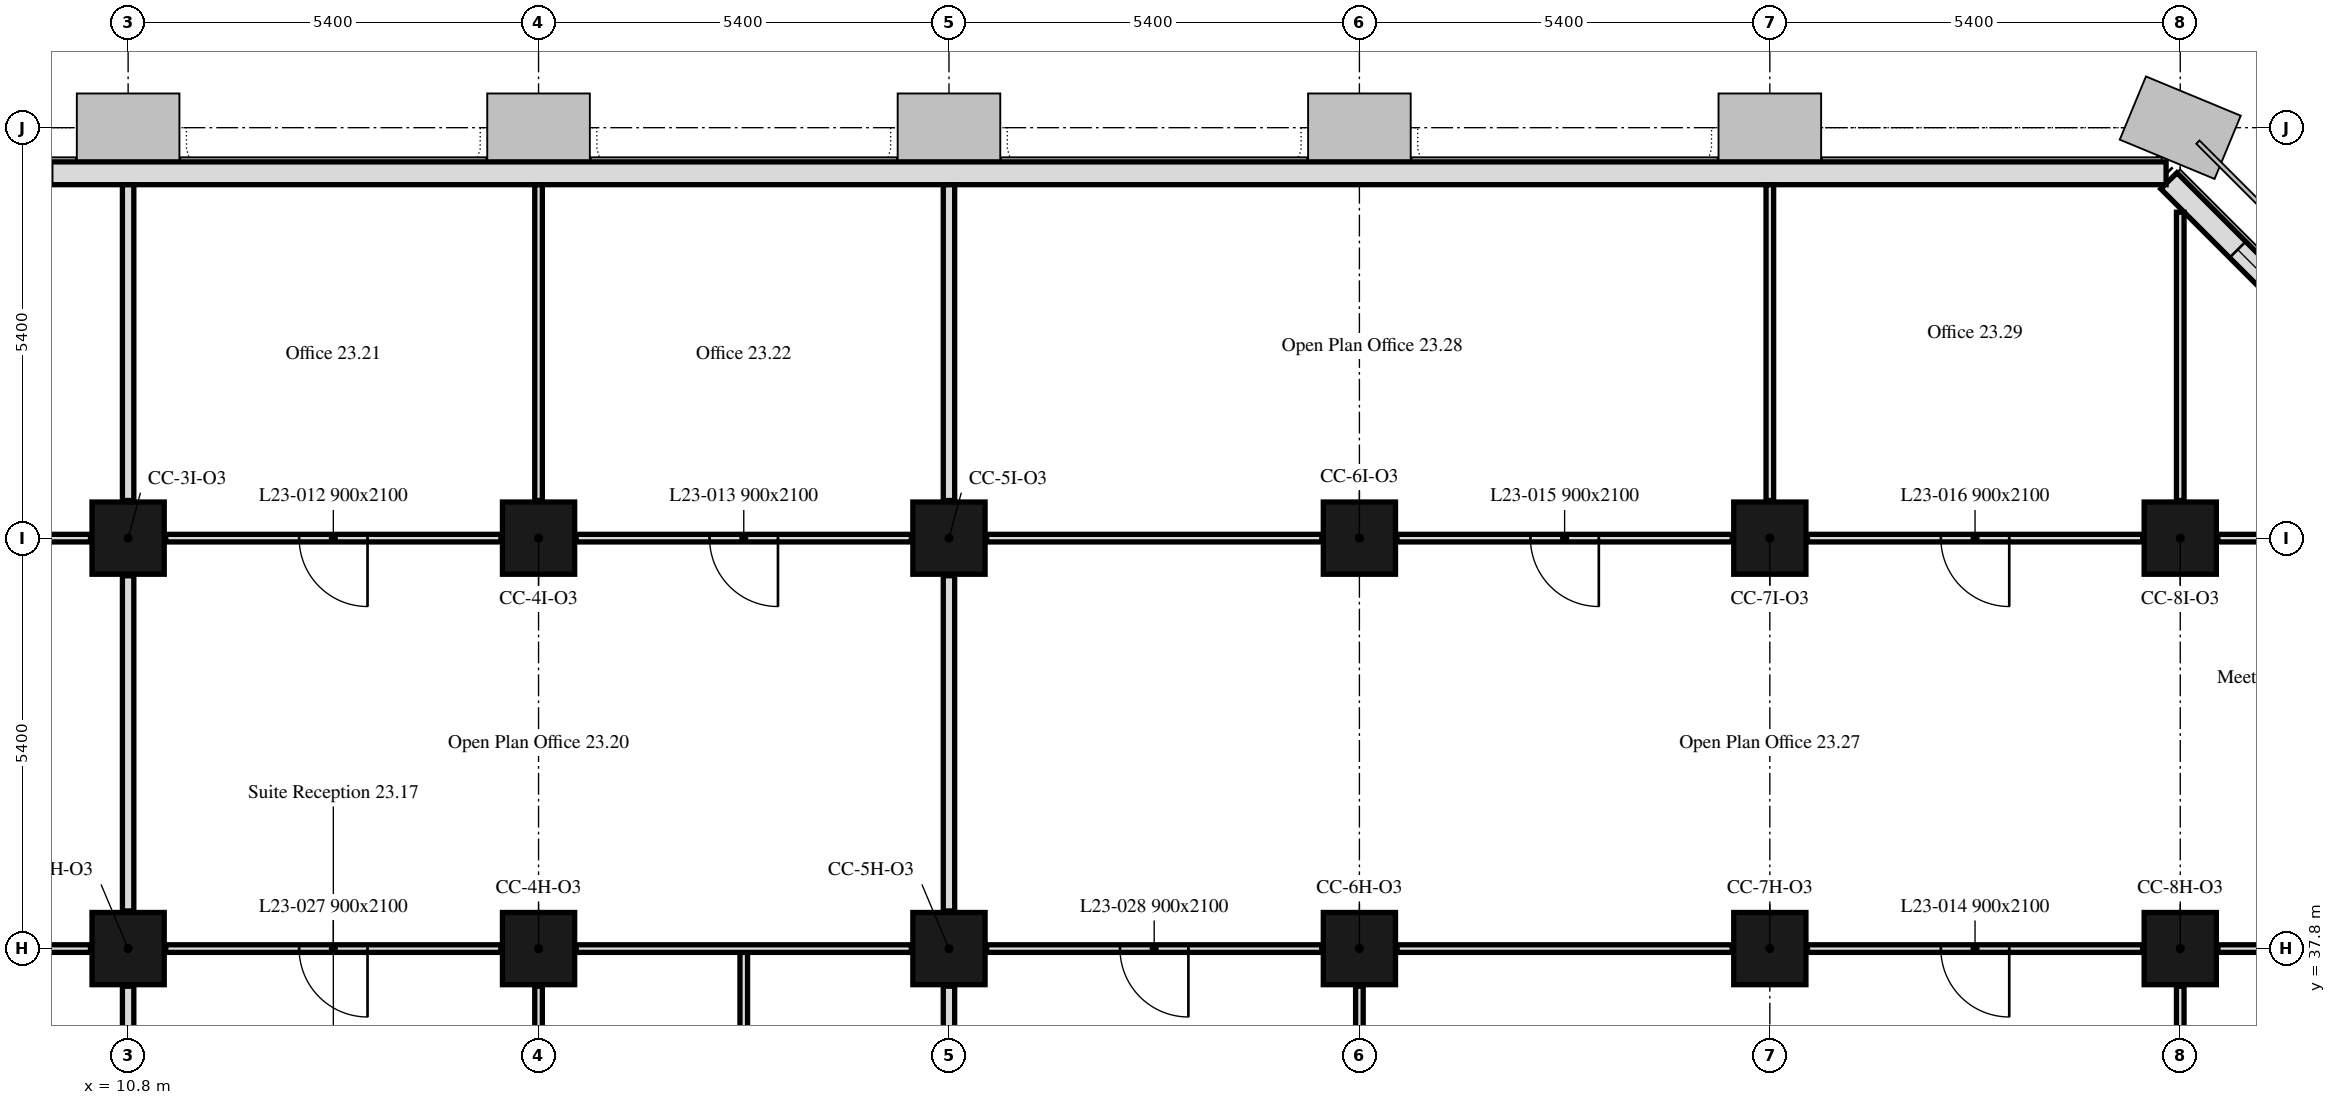
"""IFC4 building model, lengths in metres.
Left out: names, types, materials, properties, quantities, classifications, styles, units other than length and angle.
Written with IfcOpenShell. Run it as: python <this file> out.ifc"""

import sys

from ifc_helpers import new_model, si_unit, direction, frame, frame_2d, origin, origin_2d, place, context, subcontext, project, spatial, rectangle, extrude, element, fill, save


model = new_model("IFC4")
c1 = context("Model", 3, precision=1e-05, world=origin(), true_north=direction((0.0, 1.0)))
c2 = subcontext(c1, "Body", "Model", "MODEL_VIEW")
j1 = project(units=[si_unit("LENGTHUNIT", "METRE"), si_unit("PLANEANGLEUNIT", "RADIAN")], contexts=[c1])
p1 = place(None, origin())
s1 = spatial("IfcSite", under=j1, at=p1, CompositionType="ELEMENT")
p2 = place(p1, origin())
s2 = spatial("IfcBuilding", under=s1, at=p2, CompositionType="ELEMENT")
p3 = place(p2, frame((0.0, 0.0, 99.2)))
s3 = spatial("IfcBuildingStorey", under=s2, at=p3, CompositionType="ELEMENT", Elevation=99.2)
for number, where, z_axis, x_axis in (
    (1, (10.8, 37.8, 0.0), (0.0, 0.0, 1.0), (1.0, 0.0, 0.0)),
    (2, (16.2, 37.8, 0.0), (0.0, 0.0, 1.0), (1.0, 0.0, 0.0)),
    (3, (21.6, 37.8, 0.0), (0.0, 0.0, 1.0), (1.0, 0.0, 0.0)),
    (4, (27.0, 37.8, 0.0), (0.0, 0.0, 1.0), (1.0, 0.0, 0.0)),
    (5, (32.4, 37.8, 0.0), (0.0, 0.0, 1.0), (1.0, 0.0, 0.0)),
    (6, (37.8, 37.8, 0.0), (0.0, 0.0, 1.0), (1.0, 0.0, 0.0)),
    (7, (10.8, 43.2, 0.0), (0.0, 0.0, 1.0), (1.0, 0.0, 0.0)),
    (8, (16.2, 43.2, 0.0), (0.0, 0.0, 1.0), (1.0, 0.0, 0.0)),
    (9, (21.6, 43.2, 0.0), (0.0, 0.0, 1.0), (1.0, 0.0, 0.0)),
    (10, (27.0, 43.2, 0.0), (0.0, 0.0, 1.0), (1.0, 0.0, 0.0)),
    (11, (32.4, 43.2, 0.0), (0.0, 0.0, 1.0), (1.0, 0.0, 0.0)),
    (12, (37.8, 43.2, 0.0), (0.0, 0.0, 1.0), (1.0, 0.0, 0.0)),
):
    element("IfcColumn", number, at=place(p3, frame(where, z_axis=z_axis, x_axis=x_axis)), inside=s3, PredefinedType="COLUMN", context=c2, shape_type="SweptSolid", body=[
        extrude(rectangle(XDim=0.95, YDim=0.95, at=origin_2d()), origin(), (0.0, 0.0, 1.0), 3.5),
    ])
p4 = place(p3, frame((42.501, 43.051, 0.0), z_axis=(0.0, 0.0, 1.0), x_axis=(-0.707106781187, 0.707106781187, 0.0)))
e13 = element("IfcWall", 13, at=p4, inside=s3, PredefinedType="SOLIDWALL", context=c2, shape_type="SweptSolid", body=[
    extrude(rectangle(XDim=6.86, YDim=0.3, at=frame_2d((3.43, 0.0))), origin(), (0.0, 0.0, 1.0), 3.5),
])
p5 = place(p4, frame((1.28, 0.0, 0.9)))
e14 = element("IfcOpeningElement", 14, at=p5, cuts=e13, PredefinedType="OPENING", context=c2, shape_type="SweptSolid", body=[
    extrude(rectangle(XDim=1.1, YDim=1.7, at=frame_2d((0.55, 0.85))), frame((0.0, 0.16, 0.0), z_axis=(0.0, -1.0, 0.0), x_axis=(1.0, 0.0, 0.0)), (0.0, 0.0, 1.0), 0.32),
])
p6 = place(p4, frame((4.48, 0.0, 0.9)))
e15 = element("IfcOpeningElement", 15, at=p6, cuts=e13, PredefinedType="OPENING", context=c2, shape_type="SweptSolid", body=[
    extrude(rectangle(XDim=1.1, YDim=1.7, at=frame_2d((0.55, 0.85))), frame((0.0, 0.16, 0.0), z_axis=(0.0, -1.0, 0.0), x_axis=(1.0, 0.0, 0.0)), (0.0, 0.0, 1.0), 0.32),
])
p7 = place(p3, frame((37.614, 48.0, 0.0), z_axis=(0.0, 0.0, 1.0), x_axis=(-1.0, 0.0, 0.0)))
e16 = element("IfcWall", 16, at=p7, inside=s3, PredefinedType="SOLIDWALL", context=c2, shape_type="SweptSolid", body=[
    extrude(rectangle(XDim=32.027, YDim=0.3, at=frame_2d((16.014, 0.0))), origin(), (0.0, 0.0, 1.0), 3.5),
])
p8 = place(p7, frame((27.814, 0.0, 0.9)))
e17 = element("IfcOpeningElement", 17, at=p8, cuts=e16, PredefinedType="OPENING", context=c2, shape_type="SweptSolid", body=[
    extrude(rectangle(XDim=3.4, YDim=1.7, at=frame_2d((1.7, 0.85))), frame((0.0, 0.16, 0.0), z_axis=(0.0, -1.0, 0.0), x_axis=(1.0, 0.0, 0.0)), (0.0, 0.0, 1.0), 0.32),
])
p9 = place(p3, frame((10.8, 35.175, 0.0), z_axis=(0.0, 0.0, 1.0), x_axis=(0.0, 1.0, 0.0)))
e18 = element("IfcWall", 18, at=p9, inside=s3, PredefinedType="PARTITIONING", context=c2, shape_type="SweptSolid", body=[
    extrude(rectangle(XDim=2.13, YDim=0.15, at=frame_2d((1.065, 0.0))), origin(), (0.0, 0.0, 1.0), 2.75),
])
p10 = place(p3, frame((10.305, 37.8, 0.0), z_axis=(0.0, 0.0, 1.0), x_axis=(-1.0, 0.0, 0.0)))
e19 = element("IfcWall", 19, at=p10, inside=s3, PredefinedType="PARTITIONING", context=c2, shape_type="SweptSolid", body=[
    extrude(rectangle(XDim=4.41, YDim=0.1, at=frame_2d((2.205, 0.0))), origin(), (0.0, 0.0, 1.0), 2.75),
])
p11 = place(p3, frame((10.305, 43.2, 0.0), z_axis=(0.0, 0.0, 1.0), x_axis=(-1.0, 0.0, 0.0)))
e20 = element("IfcWall", 20, at=p11, inside=s3, PredefinedType="PARTITIONING", context=c2, shape_type="SweptSolid", body=[
    extrude(rectangle(XDim=9.193, YDim=0.1, at=frame_2d((4.596, 0.0))), origin(), (0.0, 0.0, 1.0), 3.5),
])
p12 = place(p11, frame((4.455, 0.0, 0.0)))
e21 = element("IfcOpeningElement", 21, at=p12, cuts=e20, PredefinedType="OPENING", context=c2, shape_type="SweptSolid", body=[
    extrude(rectangle(XDim=0.9, YDim=2.1, at=frame_2d((0.45, 1.05))), frame((0.0, 0.05, 0.0), z_axis=(0.0, -1.0, 0.0), x_axis=(1.0, 0.0, 0.0)), (0.0, 0.0, 1.0), 0.1),
])
p13 = place(p3, frame((10.8, 38.295, 0.0), z_axis=(0.0, 0.0, 1.0), x_axis=(0.0, 1.0, 0.0)))
e22 = element("IfcWall", 22, at=p13, inside=s3, PredefinedType="PARTITIONING", context=c2, shape_type="SweptSolid", body=[
    extrude(rectangle(XDim=4.41, YDim=0.15, at=frame_2d((2.205, 0.0))), origin(), (0.0, 0.0, 1.0), 2.75),
])
p14 = place(p3, frame((10.8, 43.695, 0.0), z_axis=(0.0, 0.0, 1.0), x_axis=(0.0, 1.0, 0.0)))
e23 = element("IfcWall", 23, at=p14, inside=s3, PredefinedType="PARTITIONING", context=c2, shape_type="SweptSolid", body=[
    extrude(rectangle(XDim=4.154, YDim=0.15, at=frame_2d((2.077, 0.0))), origin(), (0.0, 0.0, 1.0), 2.75),
])
p15 = place(p3, frame((16.2, 35.175, 0.0), z_axis=(0.0, 0.0, 1.0), x_axis=(0.0, 1.0, 0.0)))
e24 = element("IfcWall", 24, at=p15, inside=s3, PredefinedType="PARTITIONING", context=c2, shape_type="SweptSolid", body=[
    extrude(rectangle(XDim=2.13, YDim=0.1, at=frame_2d((1.065, 0.0))), origin(), (0.0, 0.0, 1.0), 2.75),
])
p16 = place(p3, frame((15.705, 37.8, 0.0), z_axis=(0.0, 0.0, 1.0), x_axis=(-1.0, 0.0, 0.0)))
e25 = element("IfcWall", 25, at=p16, inside=s3, PredefinedType="PARTITIONING", context=c2, shape_type="SweptSolid", body=[
    extrude(rectangle(XDim=4.41, YDim=0.1, at=frame_2d((2.205, 0.0))), origin(), (0.0, 0.0, 1.0), 2.75),
])
p17 = place(p16, frame((1.755, 0.0, 0.0)))
e26 = element("IfcOpeningElement", 26, at=p17, cuts=e25, PredefinedType="OPENING", context=c2, shape_type="SweptSolid", body=[
    extrude(rectangle(XDim=0.9, YDim=2.1, at=frame_2d((0.45, 1.05))), frame((0.0, 0.05, 0.0), z_axis=(0.0, -1.0, 0.0), x_axis=(1.0, 0.0, 0.0)), (0.0, 0.0, 1.0), 0.1),
])
p18 = place(p3, frame((18.9, 35.175, 0.0), z_axis=(0.0, 0.0, 1.0), x_axis=(0.0, 1.0, 0.0)))
e27 = element("IfcWall", 27, at=p18, inside=s3, PredefinedType="PARTITIONING", context=c2, shape_type="SweptSolid", body=[
    extrude(rectangle(XDim=2.575, YDim=0.1, at=frame_2d((1.288, 0.0))), origin(), (0.0, 0.0, 1.0), 3.5),
])
p19 = place(p3, frame((21.6, 35.175, 0.0), z_axis=(0.0, 0.0, 1.0), x_axis=(0.0, 1.0, 0.0)))
e28 = element("IfcWall", 28, at=p19, inside=s3, PredefinedType="PARTITIONING", context=c2, shape_type="SweptSolid", body=[
    extrude(rectangle(XDim=2.13, YDim=0.15, at=frame_2d((1.065, 0.0))), origin(), (0.0, 0.0, 1.0), 2.75),
])
p20 = place(p3, frame((21.105, 37.8, 0.0), z_axis=(0.0, 0.0, 1.0), x_axis=(-1.0, 0.0, 0.0)))
e29 = element("IfcWall", 29, at=p20, inside=s3, PredefinedType="PARTITIONING", context=c2, shape_type="SweptSolid", body=[
    extrude(rectangle(XDim=4.41, YDim=0.1, at=frame_2d((2.205, 0.0))), origin(), (0.0, 0.0, 1.0), 3.5),
])
p21 = place(p3, frame((21.6, 38.295, 0.0), z_axis=(0.0, 0.0, 1.0), x_axis=(0.0, 1.0, 0.0)))
e30 = element("IfcWall", 30, at=p21, inside=s3, PredefinedType="PARTITIONING", context=c2, shape_type="SweptSolid", body=[
    extrude(rectangle(XDim=4.41, YDim=0.15, at=frame_2d((2.205, 0.0))), origin(), (0.0, 0.0, 1.0), 2.75),
])
p22 = place(p3, frame((21.105, 43.2, 0.0), z_axis=(0.0, 0.0, 1.0), x_axis=(-1.0, 0.0, 0.0)))
e31 = element("IfcWall", 31, at=p22, inside=s3, PredefinedType="PARTITIONING", context=c2, shape_type="SweptSolid", body=[
    extrude(rectangle(XDim=4.41, YDim=0.1, at=frame_2d((2.205, 0.0))), origin(), (0.0, 0.0, 1.0), 3.5),
])
p23 = place(p22, frame((1.755, 0.0, 0.0)))
e32 = element("IfcOpeningElement", 32, at=p23, cuts=e31, PredefinedType="OPENING", context=c2, shape_type="SweptSolid", body=[
    extrude(rectangle(XDim=0.9, YDim=2.1, at=frame_2d((0.45, 1.05))), frame((0.0, 0.05, 0.0), z_axis=(0.0, -1.0, 0.0), x_axis=(1.0, 0.0, 0.0)), (0.0, 0.0, 1.0), 0.1),
])
p24 = place(p3, frame((15.705, 43.2, 0.0), z_axis=(0.0, 0.0, 1.0), x_axis=(-1.0, 0.0, 0.0)))
e33 = element("IfcWall", 33, at=p24, inside=s3, PredefinedType="PARTITIONING", context=c2, shape_type="SweptSolid", body=[
    extrude(rectangle(XDim=4.41, YDim=0.1, at=frame_2d((2.205, 0.0))), origin(), (0.0, 0.0, 1.0), 3.5),
])
p25 = place(p24, frame((1.755, 0.0, 0.0)))
e34 = element("IfcOpeningElement", 34, at=p25, cuts=e33, PredefinedType="OPENING", context=c2, shape_type="SweptSolid", body=[
    extrude(rectangle(XDim=0.9, YDim=2.1, at=frame_2d((0.45, 1.05))), frame((0.0, 0.05, 0.0), z_axis=(0.0, -1.0, 0.0), x_axis=(1.0, 0.0, 0.0)), (0.0, 0.0, 1.0), 0.1),
])
p26 = place(p3, frame((16.2, 47.849, 0.0), z_axis=(0.0, 0.0, 1.0), x_axis=(0.0, -1.0, 0.0)))
e35 = element("IfcWall", 35, at=p26, inside=s3, PredefinedType="PARTITIONING", context=c2, shape_type="SweptSolid", body=[
    extrude(rectangle(XDim=4.154, YDim=0.1, at=frame_2d((2.077, 0.0))), origin(), (0.0, 0.0, 1.0), 2.75),
])
p27 = place(p3, frame((21.6, 47.849, 0.0), z_axis=(0.0, 0.0, 1.0), x_axis=(0.0, -1.0, 0.0)))
e36 = element("IfcWall", 36, at=p27, inside=s3, PredefinedType="PARTITIONING", context=c2, shape_type="SweptSolid", body=[
    extrude(rectangle(XDim=4.154, YDim=0.15, at=frame_2d((2.077, 0.0))), origin(), (0.0, 0.0, 1.0), 2.75),
])
p28 = place(p3, frame((27.0, 35.175, 0.0), z_axis=(0.0, 0.0, 1.0), x_axis=(0.0, 1.0, 0.0)))
e37 = element("IfcWall", 37, at=p28, inside=s3, PredefinedType="PARTITIONING", context=c2, shape_type="SweptSolid", body=[
    extrude(rectangle(XDim=2.13, YDim=0.1, at=frame_2d((1.065, 0.0))), origin(), (0.0, 0.0, 1.0), 2.75),
])
p29 = place(p3, frame((26.505, 37.8, 0.0), z_axis=(0.0, 0.0, 1.0), x_axis=(-1.0, 0.0, 0.0)))
e38 = element("IfcWall", 38, at=p29, inside=s3, PredefinedType="PARTITIONING", context=c2, shape_type="SweptSolid", body=[
    extrude(rectangle(XDim=4.41, YDim=0.1, at=frame_2d((2.205, 0.0))), origin(), (0.0, 0.0, 1.0), 3.5),
])
p30 = place(p29, frame((1.755, 0.0, 0.0)))
e39 = element("IfcOpeningElement", 39, at=p30, cuts=e38, PredefinedType="OPENING", context=c2, shape_type="SweptSolid", body=[
    extrude(rectangle(XDim=0.9, YDim=2.1, at=frame_2d((0.45, 1.05))), frame((0.0, 0.05, 0.0), z_axis=(0.0, -1.0, 0.0), x_axis=(1.0, 0.0, 0.0)), (0.0, 0.0, 1.0), 0.1),
])
p31 = place(p3, frame((37.8, 35.175, 0.0), z_axis=(0.0, 0.0, 1.0), x_axis=(0.0, 1.0, 0.0)))
e40 = element("IfcWall", 40, at=p31, inside=s3, PredefinedType="PARTITIONING", context=c2, shape_type="SweptSolid", body=[
    extrude(rectangle(XDim=2.13, YDim=0.1, at=frame_2d((1.065, 0.0))), origin(), (0.0, 0.0, 1.0), 3.5),
])
p32 = place(p3, frame((37.305, 37.8, 0.0), z_axis=(0.0, 0.0, 1.0), x_axis=(-1.0, 0.0, 0.0)))
e41 = element("IfcWall", 41, at=p32, inside=s3, PredefinedType="PARTITIONING", context=c2, shape_type="SweptSolid", body=[
    extrude(rectangle(XDim=4.41, YDim=0.1, at=frame_2d((2.205, 0.0))), origin(), (0.0, 0.0, 1.0), 3.5),
])
p33 = place(p32, frame((1.755, 0.0, 0.0)))
e42 = element("IfcOpeningElement", 42, at=p33, cuts=e41, PredefinedType="OPENING", context=c2, shape_type="SweptSolid", body=[
    extrude(rectangle(XDim=0.9, YDim=2.1, at=frame_2d((0.45, 1.05))), frame((0.0, 0.05, 0.0), z_axis=(0.0, -1.0, 0.0), x_axis=(1.0, 0.0, 0.0)), (0.0, 0.0, 1.0), 0.1),
])
p34 = place(p3, frame((31.905, 37.8, 0.0), z_axis=(0.0, 0.0, 1.0), x_axis=(-1.0, 0.0, 0.0)))
e43 = element("IfcWall", 43, at=p34, inside=s3, PredefinedType="PARTITIONING", context=c2, shape_type="SweptSolid", body=[
    extrude(rectangle(XDim=4.41, YDim=0.1, at=frame_2d((2.205, 0.0))), origin(), (0.0, 0.0, 1.0), 3.5),
])
p35 = place(p3, frame((42.449, 37.8, 0.0), z_axis=(0.0, 0.0, 1.0), x_axis=(-1.0, 0.0, 0.0)))
e44 = element("IfcWall", 44, at=p35, inside=s3, PredefinedType="PARTITIONING", context=c2, shape_type="SweptSolid", body=[
    extrude(rectangle(XDim=4.154, YDim=0.1, at=frame_2d((2.077, 0.0))), origin(), (0.0, 0.0, 1.0), 3.5),
])
p36 = place(p3, frame((42.088, 43.2, 0.0), z_axis=(0.0, 0.0, 1.0), x_axis=(-1.0, 0.0, 0.0)))
e45 = element("IfcWall", 45, at=p36, inside=s3, PredefinedType="PARTITIONING", context=c2, shape_type="SweptSolid", body=[
    extrude(rectangle(XDim=3.793, YDim=0.1, at=frame_2d((1.896, 0.0))), origin(), (0.0, 0.0, 1.0), 3.5),
])
p37 = place(p36, frame((1.813, 0.0, 0.0)))
e46 = element("IfcOpeningElement", 46, at=p37, cuts=e45, PredefinedType="OPENING", context=c2, shape_type="SweptSolid", body=[
    extrude(rectangle(XDim=0.9, YDim=2.1, at=frame_2d((0.45, 1.05))), frame((0.0, 0.05, 0.0), z_axis=(0.0, -1.0, 0.0), x_axis=(1.0, 0.0, 0.0)), (0.0, 0.0, 1.0), 0.1),
])
p38 = place(p3, frame((37.305, 43.2, 0.0), z_axis=(0.0, 0.0, 1.0), x_axis=(-1.0, 0.0, 0.0)))
e47 = element("IfcWall", 47, at=p38, inside=s3, PredefinedType="PARTITIONING", context=c2, shape_type="SweptSolid", body=[
    extrude(rectangle(XDim=4.41, YDim=0.1, at=frame_2d((2.205, 0.0))), origin(), (0.0, 0.0, 1.0), 3.5),
])
p39 = place(p38, frame((1.755, 0.0, 0.0)))
e48 = element("IfcOpeningElement", 48, at=p39, cuts=e47, PredefinedType="OPENING", context=c2, shape_type="SweptSolid", body=[
    extrude(rectangle(XDim=0.9, YDim=2.1, at=frame_2d((0.45, 1.05))), frame((0.0, 0.05, 0.0), z_axis=(0.0, -1.0, 0.0), x_axis=(1.0, 0.0, 0.0)), (0.0, 0.0, 1.0), 0.1),
])
p40 = place(p3, frame((31.905, 43.2, 0.0), z_axis=(0.0, 0.0, 1.0), x_axis=(-1.0, 0.0, 0.0)))
e49 = element("IfcWall", 49, at=p40, inside=s3, PredefinedType="PARTITIONING", context=c2, shape_type="SweptSolid", body=[
    extrude(rectangle(XDim=4.41, YDim=0.1, at=frame_2d((2.205, 0.0))), origin(), (0.0, 0.0, 1.0), 3.5),
])
p41 = place(p40, frame((1.755, 0.0, 0.0)))
e50 = element("IfcOpeningElement", 50, at=p41, cuts=e49, PredefinedType="OPENING", context=c2, shape_type="SweptSolid", body=[
    extrude(rectangle(XDim=0.9, YDim=2.1, at=frame_2d((0.45, 1.05))), frame((0.0, 0.05, 0.0), z_axis=(0.0, -1.0, 0.0), x_axis=(1.0, 0.0, 0.0)), (0.0, 0.0, 1.0), 0.1),
])
p42 = place(p3, frame((26.505, 43.2, 0.0), z_axis=(0.0, 0.0, 1.0), x_axis=(-1.0, 0.0, 0.0)))
e51 = element("IfcWall", 51, at=p42, inside=s3, PredefinedType="PARTITIONING", context=c2, shape_type="SweptSolid", body=[
    extrude(rectangle(XDim=4.41, YDim=0.1, at=frame_2d((2.205, 0.0))), origin(), (0.0, 0.0, 1.0), 3.5),
])
p43 = place(p3, frame((32.4, 47.849, 0.0), z_axis=(0.0, 0.0, 1.0), x_axis=(0.0, -1.0, 0.0)))
e52 = element("IfcWall", 52, at=p43, inside=s3, PredefinedType="PARTITIONING", context=c2, shape_type="SweptSolid", body=[
    extrude(rectangle(XDim=4.154, YDim=0.1, at=frame_2d((2.077, 0.0))), origin(), (0.0, 0.0, 1.0), 2.75),
])
p44 = place(p3, frame((37.8, 43.695, 0.0), z_axis=(0.0, 0.0, 1.0), x_axis=(0.0, 1.0, 0.0)))
e53 = element("IfcWall", 53, at=p44, inside=s3, PredefinedType="PARTITIONING", context=c2, shape_type="SweptSolid", body=[
    extrude(rectangle(XDim=3.793, YDim=0.1, at=frame_2d((1.896, 0.0))), origin(), (0.0, 0.0, 1.0), 3.5),
])
p45 = place(p6, origin())
e54 = element("IfcWindow", 54, at=p45, inside=s3, PartitioningType="SINGLE_PANEL", PredefinedType="WINDOW", context=c2, shape_type="SweptSolid", body=[
    extrude(rectangle(XDim=1.1, YDim=1.7, at=frame_2d((0.55, 0.85))), frame((0.0, 0.03, 0.0), z_axis=(0.0, -1.0, 0.0), x_axis=(1.0, 0.0, 0.0)), (0.0, 0.0, 1.0), 0.06),
])
fill(e15, e54)
p46 = place(p25, origin())
e55 = element("IfcDoor", 55, at=p46, inside=s3, OperationType="SINGLE_SWING_RIGHT", PredefinedType="DOOR", context=c2, shape_type="SweptSolid", body=[
    extrude(rectangle(XDim=0.9, YDim=2.1, at=frame_2d((0.45, 1.05))), frame((0.0, 0.025, 0.0), z_axis=(0.0, -1.0, 0.0), x_axis=(1.0, 0.0, 0.0)), (0.0, 0.0, 1.0), 0.05),
])
fill(e34, e55)
p47 = place(p23, origin())
e56 = element("IfcDoor", 56, at=p47, inside=s3, OperationType="SINGLE_SWING_RIGHT", PredefinedType="DOOR", context=c2, shape_type="SweptSolid", body=[
    extrude(rectangle(XDim=0.9, YDim=2.1, at=frame_2d((0.45, 1.05))), frame((0.0, 0.025, 0.0), z_axis=(0.0, -1.0, 0.0), x_axis=(1.0, 0.0, 0.0)), (0.0, 0.0, 1.0), 0.05),
])
fill(e32, e56)
p48 = place(p33, origin())
e57 = element("IfcDoor", 57, at=p48, inside=s3, OperationType="SINGLE_SWING_LEFT", PredefinedType="DOOR", context=c2, shape_type="SweptSolid", body=[
    extrude(rectangle(XDim=0.9, YDim=2.1, at=frame_2d((0.45, 1.05))), frame((0.0, 0.025, 0.0), z_axis=(0.0, -1.0, 0.0), x_axis=(1.0, 0.0, 0.0)), (0.0, 0.0, 1.0), 0.05),
])
fill(e42, e57)
p49 = place(p41, origin())
e58 = element("IfcDoor", 58, at=p49, inside=s3, OperationType="SINGLE_SWING_LEFT", PredefinedType="DOOR", context=c2, shape_type="SweptSolid", body=[
    extrude(rectangle(XDim=0.9, YDim=2.1, at=frame_2d((0.45, 1.05))), frame((0.0, 0.025, 0.0), z_axis=(0.0, -1.0, 0.0), x_axis=(1.0, 0.0, 0.0)), (0.0, 0.0, 1.0), 0.05),
])
fill(e50, e58)
p50 = place(p39, origin())
e59 = element("IfcDoor", 59, at=p50, inside=s3, OperationType="SINGLE_SWING_LEFT", PredefinedType="DOOR", context=c2, shape_type="SweptSolid", body=[
    extrude(rectangle(XDim=0.9, YDim=2.1, at=frame_2d((0.45, 1.05))), frame((0.0, 0.025, 0.0), z_axis=(0.0, -1.0, 0.0), x_axis=(1.0, 0.0, 0.0)), (0.0, 0.0, 1.0), 0.05),
])
fill(e48, e59)
p51 = place(p17, origin())
e60 = element("IfcDoor", 60, at=p51, inside=s3, OperationType="SINGLE_SWING_LEFT", PredefinedType="DOOR", context=c2, shape_type="SweptSolid", body=[
    extrude(rectangle(XDim=0.9, YDim=2.1, at=frame_2d((0.45, 1.05))), frame((0.0, 0.025, 0.0), z_axis=(0.0, -1.0, 0.0), x_axis=(1.0, 0.0, 0.0)), (0.0, 0.0, 1.0), 0.05),
])
fill(e26, e60)
p52 = place(p30, origin())
e61 = element("IfcDoor", 61, at=p52, inside=s3, OperationType="SINGLE_SWING_RIGHT", PredefinedType="DOOR", context=c2, shape_type="SweptSolid", body=[
    extrude(rectangle(XDim=0.9, YDim=2.1, at=frame_2d((0.45, 1.05))), frame((0.0, 0.025, 0.0), z_axis=(0.0, -1.0, 0.0), x_axis=(1.0, 0.0, 0.0)), (0.0, 0.0, 1.0), 0.05),
])
fill(e39, e61)
save(model, sys.argv[1])
